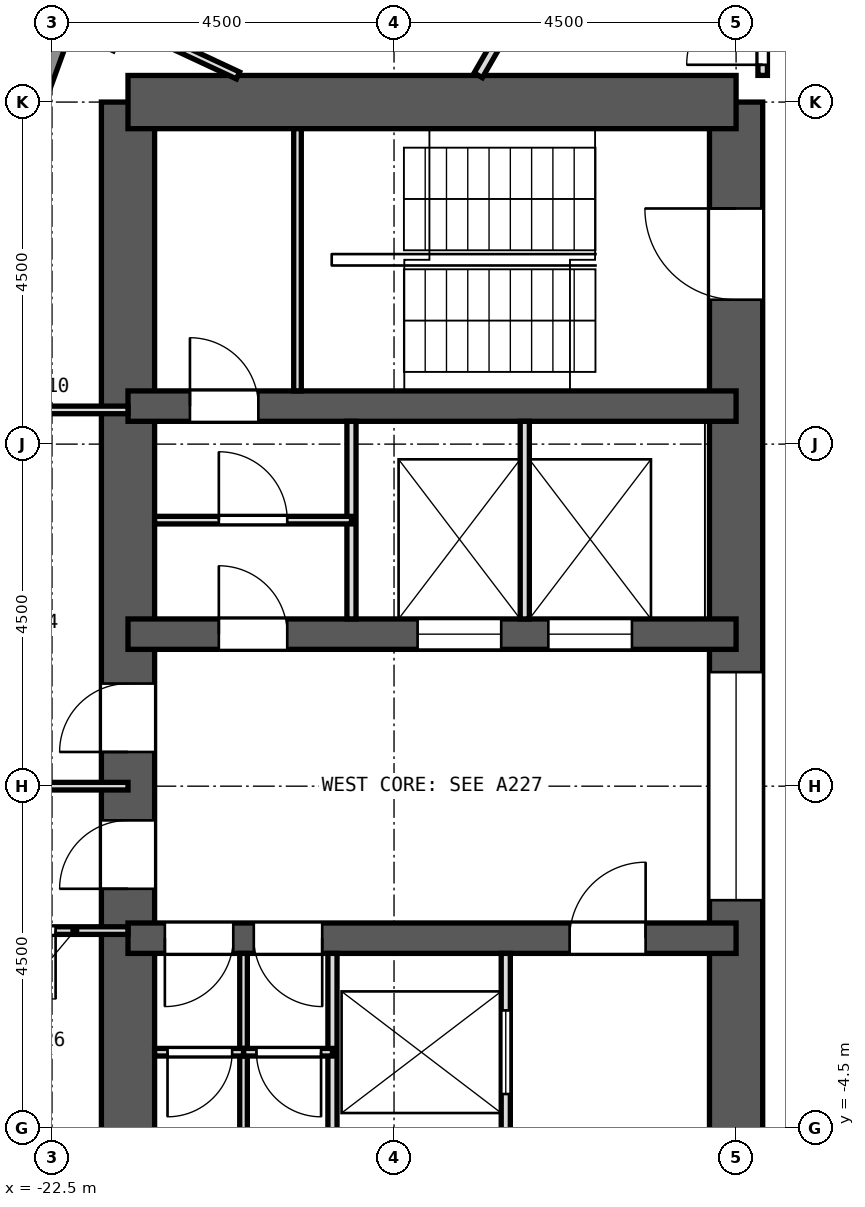
"""IFC4 building model, lengths in metres.
Left out: names, types, materials, properties, quantities, classifications, styles, units other than length and angle.
Written with IfcOpenShell. Run it as: python <this file> out.ifc"""

import sys

from ifc_helpers import new_model, si_unit, direction, frame, frame_2d, origin, place, context, subcontext, project, spatial, rectangle, extrude, element, fill, save


model = new_model("IFC4")
c1 = context("Model", 3, precision=1e-05, world=origin(), true_north=direction((0.0, 1.0)))
c2 = subcontext(c1, "Body", "Model", "MODEL_VIEW")
j1 = project(units=[si_unit("LENGTHUNIT", "METRE"), si_unit("PLANEANGLEUNIT", "RADIAN")], contexts=[c1])
p1 = place(None, origin())
s1 = spatial("IfcSite", under=j1, at=p1, CompositionType="ELEMENT")
p2 = place(p1, origin())
s2 = spatial("IfcBuilding", under=s1, at=p2, CompositionType="ELEMENT")
p3 = place(p2, frame((0.0, 0.0, 180.6)))
s3 = spatial("IfcBuildingStorey", under=s2, at=p3, CompositionType="ELEMENT", Elevation=180.6)
p4 = place(p3, frame((-13.5, -9.0, 0.0), z_axis=(0.0, 0.0, 1.0), x_axis=(0.0, 1.0, 0.0)))
e1 = element("IfcWall", 1, at=p4, inside=s3, PredefinedType="SHEAR", context=c2, shape_type="SweptSolid", body=[
    extrude(rectangle(XDim=18.0, YDim=0.7, at=frame_2d((9.0, 0.0))), origin(), (0.0, 0.0, 1.0), 3.3),
])
p5 = place(p4, frame((15.4, 0.0, 0.0)))
e2 = element("IfcOpeningElement", 2, at=p5, cuts=e1, PredefinedType="OPENING", context=c2, shape_type="SweptSolid", body=[
    extrude(rectangle(XDim=1.2, YDim=2.1, at=frame_2d((0.6, 1.05))), frame((0.0, 0.362, 0.0), z_axis=(0.0, -1.0, 0.0), x_axis=(1.0, 0.0, 0.0)), (0.0, 0.0, 1.0), 0.724),
])
p6 = place(p4, frame((1.4, 0.0, 0.0)))
e3 = element("IfcOpeningElement", 3, at=p6, cuts=e1, PredefinedType="OPENING", context=c2, shape_type="SweptSolid", body=[
    extrude(rectangle(XDim=1.2, YDim=2.1, at=frame_2d((0.6, 1.05))), frame((0.0, 0.362, 0.0), z_axis=(0.0, -1.0, 0.0), x_axis=(1.0, 0.0, 0.0)), (0.0, 0.0, 1.0), 0.724),
])
p7 = place(p4, frame((7.5, 0.0, 0.0)))
e4 = element("IfcOpeningElement", 4, at=p7, cuts=e1, PredefinedType="OPENING", context=c2, shape_type="SweptSolid", body=[
    extrude(rectangle(XDim=3.0, YDim=2.4, at=frame_2d((1.5, 1.2))), frame((0.0, 0.362, 0.0), z_axis=(0.0, -1.0, 0.0), x_axis=(1.0, 0.0, 0.0)), (0.0, 0.0, 1.0), 0.724),
])
p8 = place(p3, frame((-21.5, -9.0, 0.0), z_axis=(0.0, 0.0, 1.0), x_axis=(0.0, 1.0, 0.0)))
e5 = element("IfcWall", 5, at=p8, inside=s3, PredefinedType="SHEAR", context=c2, shape_type="SweptSolid", body=[
    extrude(rectangle(XDim=18.0, YDim=0.7, at=frame_2d((9.0, 0.0))), origin(), (0.0, 0.0, 1.0), 3.3),
])
p9 = place(p8, frame((9.45, 0.0, 0.0)))
e6 = element("IfcOpeningElement", 6, at=p9, cuts=e5, PredefinedType="OPENING", context=c2, shape_type="SweptSolid", body=[
    extrude(rectangle(XDim=0.9, YDim=2.1, at=frame_2d((0.45, 1.05))), frame((0.0, 0.362, 0.0), z_axis=(0.0, -1.0, 0.0), x_axis=(1.0, 0.0, 0.0)), (0.0, 0.0, 1.0), 0.724),
])
p10 = place(p8, frame((7.65, 0.0, 0.0)))
e7 = element("IfcOpeningElement", 7, at=p10, cuts=e5, PredefinedType="OPENING", context=c2, shape_type="SweptSolid", body=[
    extrude(rectangle(XDim=0.9, YDim=2.1, at=frame_2d((0.45, 1.05))), frame((0.0, 0.362, 0.0), z_axis=(0.0, -1.0, 0.0), x_axis=(1.0, 0.0, 0.0)), (0.0, 0.0, 1.0), 0.724),
])
p11 = place(p3, frame((-13.5, 9.0, 0.0), z_axis=(0.0, 0.0, 1.0), x_axis=(-1.0, 0.0, 0.0)))
e8 = element("IfcWall", 8, at=p11, inside=s3, PredefinedType="SHEAR", context=c2, shape_type="SweptSolid", body=[
    extrude(rectangle(XDim=8.0, YDim=0.7, at=frame_2d((4.0, 0.0))), origin(), (0.0, 0.0, 1.0), 3.3),
])
p12 = place(p3, frame((-13.5, 5.0, 0.0), z_axis=(0.0, 0.0, 1.0), x_axis=(-1.0, 0.0, 0.0)))
e9 = element("IfcWall", 9, at=p12, inside=s3, PredefinedType="SHEAR", context=c2, shape_type="SweptSolid", body=[
    extrude(rectangle(XDim=8.0, YDim=0.4, at=frame_2d((4.0, 0.0))), origin(), (0.0, 0.0, 1.0), 3.3),
])
p13 = place(p12, frame((6.285, 0.0, 0.0)))
e10 = element("IfcOpeningElement", 10, at=p13, cuts=e9, PredefinedType="OPENING", context=c2, shape_type="SweptSolid", body=[
    extrude(rectangle(XDim=0.9, YDim=2.1, at=frame_2d((0.45, 1.05))), frame((0.0, 0.212, 0.0), z_axis=(0.0, -1.0, 0.0), x_axis=(1.0, 0.0, 0.0)), (0.0, 0.0, 1.0), 0.424),
])
p14 = place(p3, frame((-13.5, 2.0, 0.0), z_axis=(0.0, 0.0, 1.0), x_axis=(-1.0, 0.0, 0.0)))
e11 = element("IfcWall", 11, at=p14, inside=s3, PredefinedType="SHEAR", context=c2, shape_type="SweptSolid", body=[
    extrude(rectangle(XDim=8.0, YDim=0.4, at=frame_2d((4.0, 0.0))), origin(), (0.0, 0.0, 1.0), 3.3),
])
p15 = place(p14, frame((1.37, 0.0, 0.0)))
e12 = element("IfcOpeningElement", 12, at=p15, cuts=e11, PredefinedType="OPENING", context=c2, shape_type="SweptSolid", body=[
    extrude(rectangle(XDim=1.1, YDim=2.1, at=frame_2d((0.55, 1.05))), frame((0.0, 0.212, 0.0), z_axis=(0.0, -1.0, 0.0), x_axis=(1.0, 0.0, 0.0)), (0.0, 0.0, 1.0), 0.424),
])
p16 = place(p14, frame((3.09, 0.0, 0.0)))
e13 = element("IfcOpeningElement", 13, at=p16, cuts=e11, PredefinedType="OPENING", context=c2, shape_type="SweptSolid", body=[
    extrude(rectangle(XDim=1.1, YDim=2.1, at=frame_2d((0.55, 1.05))), frame((0.0, 0.212, 0.0), z_axis=(0.0, -1.0, 0.0), x_axis=(1.0, 0.0, 0.0)), (0.0, 0.0, 1.0), 0.424),
])
p17 = place(p14, frame((5.905, 0.0, 0.0)))
e14 = element("IfcOpeningElement", 14, at=p17, cuts=e11, PredefinedType="OPENING", context=c2, shape_type="SweptSolid", body=[
    extrude(rectangle(XDim=0.9, YDim=2.1, at=frame_2d((0.45, 1.05))), frame((0.0, 0.212, 0.0), z_axis=(0.0, -1.0, 0.0), x_axis=(1.0, 0.0, 0.0)), (0.0, 0.0, 1.0), 0.424),
])
p18 = place(p3, frame((-13.5, -2.0, 0.0), z_axis=(0.0, 0.0, 1.0), x_axis=(-1.0, 0.0, 0.0)))
e15 = element("IfcWall", 15, at=p18, inside=s3, PredefinedType="SHEAR", context=c2, shape_type="SweptSolid", body=[
    extrude(rectangle(XDim=8.0, YDim=0.4, at=frame_2d((4.0, 0.0))), origin(), (0.0, 0.0, 1.0), 3.3),
])
p19 = place(p18, frame((1.19, 0.0, 0.0)))
e16 = element("IfcOpeningElement", 16, at=p19, cuts=e15, PredefinedType="OPENING", context=c2, shape_type="SweptSolid", body=[
    extrude(rectangle(XDim=1.0, YDim=2.1, at=frame_2d((0.5, 1.05))), frame((0.0, 0.212, 0.0), z_axis=(0.0, -1.0, 0.0), x_axis=(1.0, 0.0, 0.0)), (0.0, 0.0, 1.0), 0.424),
])
p20 = place(p18, frame((5.445, 0.0, 0.0)))
e17 = element("IfcOpeningElement", 17, at=p20, cuts=e15, PredefinedType="OPENING", context=c2, shape_type="SweptSolid", body=[
    extrude(rectangle(XDim=0.9, YDim=2.1, at=frame_2d((0.45, 1.05))), frame((0.0, 0.212, 0.0), z_axis=(0.0, -1.0, 0.0), x_axis=(1.0, 0.0, 0.0)), (0.0, 0.0, 1.0), 0.424),
])
p21 = place(p18, frame((6.615, 0.0, 0.0)))
e18 = element("IfcOpeningElement", 18, at=p21, cuts=e15, PredefinedType="OPENING", context=c2, shape_type="SweptSolid", body=[
    extrude(rectangle(XDim=0.9, YDim=2.1, at=frame_2d((0.45, 1.05))), frame((0.0, 0.212, 0.0), z_axis=(0.0, -1.0, 0.0), x_axis=(1.0, 0.0, 0.0)), (0.0, 0.0, 1.0), 0.424),
])
p22 = place(p3, frame((-22.531, 10.036, 0.0), z_axis=(0.0, 0.0, 1.0), x_axis=(-0.342032843455, -0.93968799822, 0.0)))
e19 = element("IfcWall", 19, at=p22, inside=s3, PredefinedType="SOLIDWALL", context=c2, shape_type="SweptSolid", body=[
    extrude(rectangle(XDim=3.45, YDim=0.6, at=frame_2d((1.725, 0.0))), origin(), (0.0, 0.0, 1.0), 2.85),
])
p23 = place(p3, frame((-21.516, 10.033, 0.0), z_axis=(0.0, 0.0, 1.0), x_axis=(0.906055596822, -0.423158664648, 0.0)))
e20 = element("IfcWall", 20, at=p23, inside=s3, PredefinedType="PARTITIONING", context=c2, shape_type="SweptSolid", body=[
    extrude(rectangle(XDim=1.614, YDim=0.1, at=frame_2d((0.807, 0.0))), origin(), (0.0, 0.0, 1.0), 2.85),
])
p24 = place(p3, frame((-16.892, 9.352, 0.0), z_axis=(0.0, 0.0, 1.0), x_axis=(0.499683424426, 0.866208101644, 0.0)))
e21 = element("IfcWall", 21, at=p24, inside=s3, PredefinedType="PARTITIONING", context=c2, shape_type="SweptSolid", body=[
    extrude(rectangle(XDim=1.986, YDim=0.125, at=frame_2d((0.993, 0.0))), origin(), (0.0, 0.0, 1.0), 2.85),
])
p25 = place(p3, frame((-13.15, 9.351, 0.0), z_axis=(0.0, 0.0, 1.0), x_axis=(0.0, 1.0, 0.0)))
e22 = element("IfcWall", 22, at=p25, inside=s3, PredefinedType="PARTITIONING", context=c2, shape_type="SweptSolid", body=[
    extrude(rectangle(XDim=2.216, YDim=0.125, at=frame_2d((1.108, 0.0))), origin(), (0.0, 0.0, 1.0), 2.85),
])
p26 = place(p25, frame((0.139, 0.0, 0.0)))
e23 = element("IfcOpeningElement", 23, at=p26, cuts=e22, PredefinedType="OPENING", context=c2, shape_type="SweptSolid", body=[
    extrude(rectangle(XDim=1.0, YDim=2.1, at=frame_2d((0.5, 1.05))), frame((0.0, 0.074, 0.0), z_axis=(0.0, -1.0, 0.0), x_axis=(1.0, 0.0, 0.0)), (0.0, 0.0, 1.0), 0.149),
])
p27 = place(p3, frame((-21.5, 4.95, 0.0), z_axis=(0.0, 0.0, 1.0), x_axis=(-1.0, 0.0, 0.0)))
e24 = element("IfcWall", 24, at=p27, inside=s3, PredefinedType="PARTITIONING", context=c2, shape_type="SweptSolid", body=[
    extrude(rectangle(XDim=2.307, YDim=0.1, at=frame_2d((1.153, 0.0))), origin(), (0.0, 0.0, 1.0), 2.85),
])
p28 = place(p3, frame((-21.5, -1.9, 0.0), z_axis=(0.0, 0.0, 1.0), x_axis=(-1.0, 0.0, 0.0)))
e25 = element("IfcWall", 25, at=p28, inside=s3, PredefinedType="PARTITIONING", context=c2, shape_type="SweptSolid", body=[
    extrude(rectangle(XDim=2.805, YDim=0.1, at=frame_2d((1.402, 0.0))), origin(), (0.0, 0.0, 1.0), 2.85),
])
p29 = place(p28, frame((0.952, 0.0, 0.0)))
e26 = element("IfcOpeningElement", 26, at=p29, cuts=e25, PredefinedType="OPENING", context=c2, shape_type="SweptSolid", body=[
    extrude(rectangle(XDim=0.9, YDim=2.1, at=frame_2d((0.45, 1.05))), frame((0.0, 0.062, 0.0), z_axis=(0.0, -1.0, 0.0), x_axis=(1.0, 0.0, 0.0)), (0.0, 0.0, 1.0), 0.124),
])
p30 = place(p3, frame((-21.5, 0.0, 0.0), z_axis=(0.0, 0.0, 1.0), x_axis=(-1.0, 0.0, 0.0)))
e27 = element("IfcWall", 27, at=p30, inside=s3, PredefinedType="PARTITIONING", context=c2, shape_type="SweptSolid", body=[
    extrude(rectangle(XDim=2.805, YDim=0.1, at=frame_2d((1.402, 0.0))), origin(), (0.0, 0.0, 1.0), 2.85),
])
for number, where, z_axis, x_axis in (
    (28, (-16.28, 2.2, 0.0), (0.0, 0.0, 1.0), (0.0, 1.0, 0.0)),
    (29, (-18.56, 2.2, 0.0), (0.0, 0.0, 1.0), (0.0, 1.0, 0.0)),
):
    element("IfcWall", number, at=place(p3, frame(where, z_axis=z_axis, x_axis=x_axis)), inside=s3, PredefinedType="PARTITIONING", context=c2, shape_type="SweptSolid", body=[
        extrude(rectangle(XDim=2.6, YDim=0.12, at=frame_2d((1.3, 0.0))), origin(), (0.0, 0.0, 1.0), 2.85),
    ])
p31 = place(p3, frame((-16.53, -4.8, 0.0), z_axis=(0.0, 0.0, 1.0), x_axis=(0.0, 1.0, 0.0)))
e30 = element("IfcWall", 30, at=p31, inside=s3, PredefinedType="PARTITIONING", context=c2, shape_type="SweptSolid", body=[
    extrude(rectangle(XDim=2.6, YDim=0.12, at=frame_2d((1.3, 0.0))), origin(), (0.0, 0.0, 1.0), 2.85),
])
p32 = place(p31, frame((0.75, 0.0, 0.0)))
e31 = element("IfcOpeningElement", 31, at=p32, cuts=e30, PredefinedType="OPENING", context=c2, shape_type="SweptSolid", body=[
    extrude(rectangle(XDim=1.1, YDim=2.1, at=frame_2d((0.55, 1.05))), frame((0.0, 0.072, 0.0), z_axis=(0.0, -1.0, 0.0), x_axis=(1.0, 0.0, 0.0)), (0.0, 0.0, 1.0), 0.144),
])
p33 = place(p3, frame((-18.81, -4.8, 0.0), z_axis=(0.0, 0.0, 1.0), x_axis=(0.0, 1.0, 0.0)))
e32 = element("IfcWall", 32, at=p33, inside=s3, PredefinedType="PARTITIONING", context=c2, shape_type="SweptSolid", body=[
    extrude(rectangle(XDim=2.6, YDim=0.12, at=frame_2d((1.3, 0.0))), origin(), (0.0, 0.0, 1.0), 2.85),
])
p34 = place(p3, frame((-19.98, -4.8, 0.0), z_axis=(0.0, 0.0, 1.0), x_axis=(0.0, 1.0, 0.0)))
e33 = element("IfcWall", 33, at=p34, inside=s3, PredefinedType="PARTITIONING", context=c2, shape_type="SweptSolid", body=[
    extrude(rectangle(XDim=2.6, YDim=0.1, at=frame_2d((1.3, 0.0))), origin(), (0.0, 0.0, 1.0), 2.85),
])
p35 = place(p3, frame((-18.56, 3.5, 0.0), z_axis=(0.0, 0.0, 1.0), x_axis=(-1.0, 0.0, 0.0)))
e34 = element("IfcWall", 34, at=p35, inside=s3, PredefinedType="PARTITIONING", context=c2, shape_type="SweptSolid", body=[
    extrude(rectangle(XDim=2.59, YDim=0.1, at=frame_2d((1.295, 0.0))), origin(), (0.0, 0.0, 1.0), 2.85),
])
p36 = place(p35, frame((0.845, 0.0, 0.0)))
e35 = element("IfcOpeningElement", 35, at=p36, cuts=e34, PredefinedType="OPENING", context=c2, shape_type="SweptSolid", body=[
    extrude(rectangle(XDim=0.9, YDim=2.1, at=frame_2d((0.45, 1.05))), frame((0.0, 0.062, 0.0), z_axis=(0.0, -1.0, 0.0), x_axis=(1.0, 0.0, 0.0)), (0.0, 0.0, 1.0), 0.124),
])
p37 = place(p3, frame((-18.81, -3.5, 0.0), z_axis=(0.0, 0.0, 1.0), x_axis=(-1.0, 0.0, 0.0)))
e36 = element("IfcWall", 36, at=p37, inside=s3, PredefinedType="PARTITIONING", context=c2, shape_type="SweptSolid", body=[
    extrude(rectangle(XDim=1.17, YDim=0.1, at=frame_2d((0.585, 0.0))), origin(), (0.0, 0.0, 1.0), 2.85),
])
p38 = place(p37, frame((0.15, 0.0, 0.0)))
e37 = element("IfcOpeningElement", 37, at=p38, cuts=e36, PredefinedType="OPENING", context=c2, shape_type="SweptSolid", body=[
    extrude(rectangle(XDim=0.85, YDim=2.1, at=frame_2d((0.425, 1.05))), frame((0.0, 0.062, 0.0), z_axis=(0.0, -1.0, 0.0), x_axis=(1.0, 0.0, 0.0)), (0.0, 0.0, 1.0), 0.124),
])
p39 = place(p3, frame((-19.98, -3.5, 0.0), z_axis=(0.0, 0.0, 1.0), x_axis=(-1.0, 0.0, 0.0)))
e38 = element("IfcWall", 38, at=p39, inside=s3, PredefinedType="PARTITIONING", context=c2, shape_type="SweptSolid", body=[
    extrude(rectangle(XDim=1.17, YDim=0.1, at=frame_2d((0.585, 0.0))), origin(), (0.0, 0.0, 1.0), 2.85),
])
p40 = place(p39, frame((0.15, 0.0, 0.0)))
e39 = element("IfcOpeningElement", 39, at=p40, cuts=e38, PredefinedType="OPENING", context=c2, shape_type="SweptSolid", body=[
    extrude(rectangle(XDim=0.85, YDim=2.1, at=frame_2d((0.425, 1.05))), frame((0.0, 0.062, 0.0), z_axis=(0.0, -1.0, 0.0), x_axis=(1.0, 0.0, 0.0)), (0.0, 0.0, 1.0), 0.124),
])
p41 = place(p3, frame((-19.27, 5.2, 0.0), z_axis=(0.0, 0.0, 1.0), x_axis=(0.0, 1.0, 0.0)))
e40 = element("IfcWall", 40, at=p41, inside=s3, PredefinedType="PARTITIONING", context=c2, shape_type="SweptSolid", body=[
    extrude(rectangle(XDim=3.45, YDim=0.1, at=frame_2d((1.725, 0.0))), origin(), (0.0, 0.0, 1.0), 2.85),
])
p42 = place(p26, origin())
e41 = element("IfcDoor", 41, at=p42, inside=s3, OperationType="SINGLE_SWING_LEFT", PredefinedType="DOOR", context=c2, shape_type="SweptSolid", body=[
    extrude(rectangle(XDim=1.0, YDim=2.1, at=frame_2d((0.5, 1.05))), frame((0.0, 0.025, 0.0), z_axis=(0.0, -1.0, 0.0), x_axis=(1.0, 0.0, 0.0)), (0.0, 0.0, 1.0), 0.05),
])
fill(e23, e41)
p43 = place(p15, origin())
e42 = element("IfcDoor", 42, at=p43, inside=s3, OperationType="DOUBLE_DOOR_SLIDING", PredefinedType="DOOR", context=c2, shape_type="SweptSolid", body=[
    extrude(rectangle(XDim=1.1, YDim=2.1, at=frame_2d((0.55, 1.05))), frame((0.0, 0.025, 0.0), z_axis=(0.0, -1.0, 0.0), x_axis=(1.0, 0.0, 0.0)), (0.0, 0.0, 1.0), 0.05),
])
fill(e12, e42)
p44 = place(p16, origin())
e43 = element("IfcDoor", 43, at=p44, inside=s3, OperationType="DOUBLE_DOOR_SLIDING", PredefinedType="DOOR", context=c2, shape_type="SweptSolid", body=[
    extrude(rectangle(XDim=1.1, YDim=2.1, at=frame_2d((0.55, 1.05))), frame((0.0, 0.025, 0.0), z_axis=(0.0, -1.0, 0.0), x_axis=(1.0, 0.0, 0.0)), (0.0, 0.0, 1.0), 0.05),
])
fill(e13, e43)
p45 = place(p32, origin())
e44 = element("IfcDoor", 44, at=p45, inside=s3, OperationType="DOUBLE_DOOR_SLIDING", PredefinedType="DOOR", context=c2, shape_type="SweptSolid", body=[
    extrude(rectangle(XDim=1.1, YDim=2.1, at=frame_2d((0.55, 1.05))), frame((0.0, 0.025, 0.0), z_axis=(0.0, -1.0, 0.0), x_axis=(1.0, 0.0, 0.0)), (0.0, 0.0, 1.0), 0.05),
])
fill(e31, e44)
p46 = place(p17, frame((0.9, 0.0, 0.0), z_axis=(0.0, 0.0, 1.0), x_axis=(-1.0, 0.0, 0.0)))
e45 = element("IfcDoor", 45, at=p46, inside=s3, OperationType="SINGLE_SWING_LEFT", PredefinedType="DOOR", context=c2, shape_type="SweptSolid", body=[
    extrude(rectangle(XDim=0.9, YDim=2.1, at=frame_2d((0.45, 1.05))), frame((0.0, 0.025, 0.0), z_axis=(0.0, -1.0, 0.0), x_axis=(1.0, 0.0, 0.0)), (0.0, 0.0, 1.0), 0.05),
])
fill(e14, e45)
p47 = place(p19, frame((1.0, 0.0, 0.0), z_axis=(0.0, 0.0, 1.0), x_axis=(-1.0, 0.0, 0.0)))
e46 = element("IfcDoor", 46, at=p47, inside=s3, OperationType="SINGLE_SWING_RIGHT", PredefinedType="DOOR", context=c2, shape_type="SweptSolid", body=[
    extrude(rectangle(XDim=1.0, YDim=2.1, at=frame_2d((0.5, 1.05))), frame((0.0, 0.025, 0.0), z_axis=(0.0, -1.0, 0.0), x_axis=(1.0, 0.0, 0.0)), (0.0, 0.0, 1.0), 0.05),
])
fill(e16, e46)
p48 = place(p20, origin())
e47 = element("IfcDoor", 47, at=p48, inside=s3, OperationType="SINGLE_SWING_LEFT", PredefinedType="DOOR", context=c2, shape_type="SweptSolid", body=[
    extrude(rectangle(XDim=0.9, YDim=2.1, at=frame_2d((0.45, 1.05))), frame((0.0, 0.025, 0.0), z_axis=(0.0, -1.0, 0.0), x_axis=(1.0, 0.0, 0.0)), (0.0, 0.0, 1.0), 0.05),
])
fill(e17, e47)
p49 = place(p21, origin())
e48 = element("IfcDoor", 48, at=p49, inside=s3, OperationType="SINGLE_SWING_RIGHT", PredefinedType="DOOR", context=c2, shape_type="SweptSolid", body=[
    extrude(rectangle(XDim=0.9, YDim=2.1, at=frame_2d((0.45, 1.05))), frame((0.0, 0.025, 0.0), z_axis=(0.0, -1.0, 0.0), x_axis=(1.0, 0.0, 0.0)), (0.0, 0.0, 1.0), 0.05),
])
fill(e18, e48)
p50 = place(p9, origin())
e49 = element("IfcDoor", 49, at=p50, inside=s3, OperationType="SINGLE_SWING_LEFT", PredefinedType="DOOR", context=c2, shape_type="SweptSolid", body=[
    extrude(rectangle(XDim=0.9, YDim=2.1, at=frame_2d((0.45, 1.05))), frame((0.0, 0.025, 0.0), z_axis=(0.0, -1.0, 0.0), x_axis=(1.0, 0.0, 0.0)), (0.0, 0.0, 1.0), 0.05),
])
fill(e6, e49)
p51 = place(p29, origin())
e50 = element("IfcDoor", 50, at=p51, inside=s3, OperationType="SINGLE_SWING_LEFT", PredefinedType="DOOR", context=c2, shape_type="SweptSolid", body=[
    extrude(rectangle(XDim=0.9, YDim=2.1, at=frame_2d((0.45, 1.05))), frame((0.0, 0.025, 0.0), z_axis=(0.0, -1.0, 0.0), x_axis=(1.0, 0.0, 0.0)), (0.0, 0.0, 1.0), 0.05),
])
fill(e26, e50)
p52 = place(p10, origin())
e51 = element("IfcDoor", 51, at=p52, inside=s3, OperationType="SINGLE_SWING_LEFT", PredefinedType="DOOR", context=c2, shape_type="SweptSolid", body=[
    extrude(rectangle(XDim=0.9, YDim=2.1, at=frame_2d((0.45, 1.05))), frame((0.0, 0.025, 0.0), z_axis=(0.0, -1.0, 0.0), x_axis=(1.0, 0.0, 0.0)), (0.0, 0.0, 1.0), 0.05),
])
fill(e7, e51)
p53 = place(p36, frame((0.9, 0.0, 0.0), z_axis=(0.0, 0.0, 1.0), x_axis=(-1.0, 0.0, 0.0)))
e52 = element("IfcDoor", 52, at=p53, inside=s3, OperationType="SINGLE_SWING_LEFT", PredefinedType="DOOR", context=c2, shape_type="SweptSolid", body=[
    extrude(rectangle(XDim=0.9, YDim=2.1, at=frame_2d((0.45, 1.05))), frame((0.0, 0.025, 0.0), z_axis=(0.0, -1.0, 0.0), x_axis=(1.0, 0.0, 0.0)), (0.0, 0.0, 1.0), 0.05),
])
fill(e35, e52)
p54 = place(p13, frame((0.9, 0.0, 0.0), z_axis=(0.0, 0.0, 1.0), x_axis=(-1.0, 0.0, 0.0)))
e53 = element("IfcDoor", 53, at=p54, inside=s3, OperationType="SINGLE_SWING_LEFT", PredefinedType="DOOR", context=c2, shape_type="SweptSolid", body=[
    extrude(rectangle(XDim=0.9, YDim=2.1, at=frame_2d((0.45, 1.05))), frame((0.0, 0.025, 0.0), z_axis=(0.0, -1.0, 0.0), x_axis=(1.0, 0.0, 0.0)), (0.0, 0.0, 1.0), 0.05),
])
fill(e10, e53)
p55 = place(p38, origin())
e54 = element("IfcDoor", 54, at=p55, inside=s3, OperationType="SINGLE_SWING_LEFT", PredefinedType="DOOR", context=c2, shape_type="SweptSolid", body=[
    extrude(rectangle(XDim=0.85, YDim=2.1, at=frame_2d((0.425, 1.05))), frame((0.0, 0.025, 0.0), z_axis=(0.0, -1.0, 0.0), x_axis=(1.0, 0.0, 0.0)), (0.0, 0.0, 1.0), 0.05),
])
fill(e37, e54)
p56 = place(p40, origin())
e55 = element("IfcDoor", 55, at=p56, inside=s3, OperationType="SINGLE_SWING_RIGHT", PredefinedType="DOOR", context=c2, shape_type="SweptSolid", body=[
    extrude(rectangle(XDim=0.85, YDim=2.1, at=frame_2d((0.425, 1.05))), frame((0.0, 0.025, 0.0), z_axis=(0.0, -1.0, 0.0), x_axis=(1.0, 0.0, 0.0)), (0.0, 0.0, 1.0), 0.05),
])
fill(e39, e55)
p57 = place(p5, origin())
e56 = element("IfcDoor", 56, at=p57, inside=s3, OperationType="SINGLE_SWING_RIGHT", PredefinedType="DOOR", context=c2, shape_type="SweptSolid", body=[
    extrude(rectangle(XDim=1.2, YDim=2.1, at=frame_2d((0.6, 1.05))), frame((0.0, 0.025, 0.0), z_axis=(0.0, -1.0, 0.0), x_axis=(1.0, 0.0, 0.0)), (0.0, 0.0, 1.0), 0.05),
])
fill(e2, e56)
p58 = place(p7, origin())
e57 = element("IfcDoor", 57, at=p58, inside=s3, OperationType="DOUBLE_DOOR_SLIDING", PredefinedType="DOOR", context=c2, shape_type="SweptSolid", body=[
    extrude(rectangle(XDim=3.0, YDim=2.4, at=frame_2d((1.5, 1.2))), frame((0.0, 0.025, 0.0), z_axis=(0.0, -1.0, 0.0), x_axis=(1.0, 0.0, 0.0)), (0.0, 0.0, 1.0), 0.05),
])
fill(e4, e57)
save(model, sys.argv[1])
